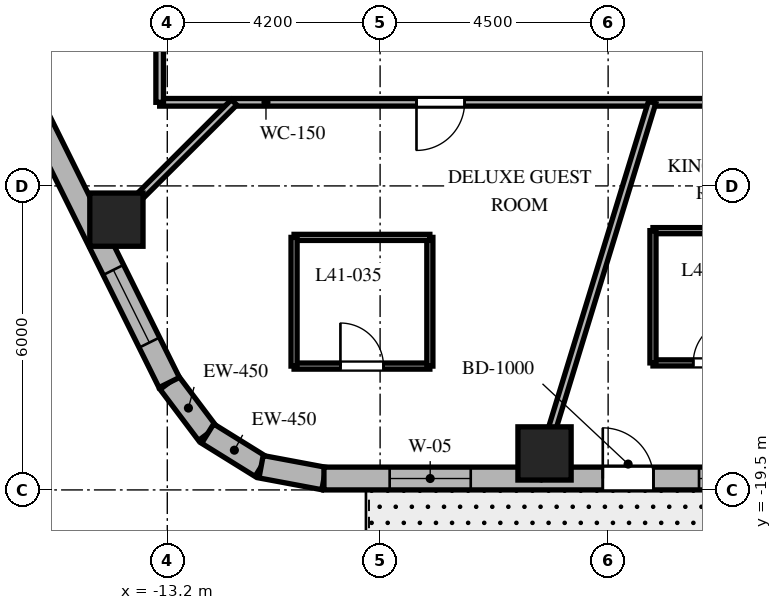
"""IFC4 building model, lengths in metres.
Left out: names, types, materials, properties, quantities, classifications, styles, units other than length and angle.
Written with IfcOpenShell. Run it as: python <this file> out.ifc"""

import sys

from ifc_helpers import new_model, si_unit, direction, frame, frame_2d, origin, origin_2d, place, context, subcontext, project, spatial, rectangle, extrude, element, fill, save


model = new_model("IFC4")
c1 = context("Model", 3, precision=1e-05, world=origin(), true_north=direction((0.0, 1.0)))
c2 = subcontext(c1, "Body", "Model", "MODEL_VIEW")
j1 = project(units=[si_unit("LENGTHUNIT", "METRE"), si_unit("PLANEANGLEUNIT", "RADIAN")], contexts=[c1])
p1 = place(None, origin())
s1 = spatial("IfcSite", under=j1, at=p1, CompositionType="ELEMENT")
p2 = place(p1, origin())
s2 = spatial("IfcBuilding", under=s1, at=p2, CompositionType="ELEMENT")
p3 = place(p2, frame((0.0, 0.0, 166.5)))
s3 = spatial("IfcBuildingStorey", under=s2, at=p3, CompositionType="ELEMENT", Elevation=166.5)
for number, where, z_axis, x_axis in (
    (1, (-5.755, -18.78, 0.0), (0.0, 0.0, 1.0), (1.0, 0.0, 0.0)),
    (2, (-14.204, -14.166, 0.0), (0.0, 0.0, 1.0), (1.0, 0.0, 0.0)),
):
    element("IfcColumn", number, at=place(p3, frame(where, z_axis=z_axis, x_axis=x_axis)), inside=s3, PredefinedType="COLUMN", context=c2, shape_type="SweptSolid", body=[
        extrude(rectangle(XDim=1.05, YDim=1.05, at=origin_2d()), origin(), (0.0, 0.0, 1.0), 3.7),
    ])
p4 = place(p3, frame((-13.162, -17.381, 0.0), z_axis=(0.0, 0.0, 1.0), x_axis=(0.601515770517, -0.798860925205, 0.0)))
e3 = element("IfcWall", 3, at=p4, inside=s3, PredefinedType="SOLIDWALL", context=c2, shape_type="SweptSolid", body=[
    extrude(rectangle(XDim=1.262, YDim=0.45, at=frame_2d((0.631, 0.0))), origin(), (0.0, 0.0, 1.0), 3.38),
])
p5 = place(p3, frame((-12.403, -18.389, 0.0), z_axis=(0.0, 0.0, 1.0), x_axis=(0.849795170926, -0.527113049991, 0.0)))
e4 = element("IfcWall", 4, at=p5, inside=s3, PredefinedType="SOLIDWALL", context=c2, shape_type="SweptSolid", body=[
    extrude(rectangle(XDim=1.241, YDim=0.45, at=frame_2d((0.62, 0.0))), origin(), (0.0, 0.0, 1.0), 3.38),
])
p6 = place(p3, frame((-11.349, -19.043, 0.0), z_axis=(0.0, 0.0, 1.0), x_axis=(0.982931267051, -0.183973161772, 0.0)))
e5 = element("IfcWall", 5, at=p6, inside=s3, PredefinedType="SOLIDWALL", context=c2, shape_type="SweptSolid", body=[
    extrude(rectangle(XDim=1.262, YDim=0.45, at=frame_2d((0.631, 0.0))), origin(), (0.0, 0.0, 1.0), 3.38),
])
p7 = place(p3, frame((-10.108, -19.275, 0.0), z_axis=(0.0, 0.0, 1.0), x_axis=(1.0, 0.0, 0.0)))
e6 = element("IfcWall", 6, at=p7, inside=s3, PredefinedType="SOLIDWALL", context=c2, shape_type="SweptSolid", body=[
    extrude(rectangle(XDim=21.829, YDim=0.45, at=frame_2d((10.915, 0.0))), origin(), (0.0, 0.0, 1.0), 3.38),
])
p8 = place(p7, frame((5.503, 0.0, 0.0)))
e7 = element("IfcOpeningElement", 7, at=p8, cuts=e6, PredefinedType="OPENING", context=c2, shape_type="SweptSolid", body=[
    extrude(rectangle(XDim=1.0, YDim=2.15, at=frame_2d((0.5, 1.075))), frame((0.0, 0.235, 0.0), z_axis=(0.0, -1.0, 0.0), x_axis=(1.0, 0.0, 0.0)), (0.0, 0.0, 1.0), 0.47),
])
p9 = place(p7, frame((1.297, 0.0, 0.8)))
e8 = element("IfcOpeningElement", 8, at=p9, cuts=e6, PredefinedType="OPENING", context=c2, shape_type="SweptSolid", body=[
    extrude(rectangle(XDim=1.6, YDim=1.75, at=frame_2d((0.8, 0.875))), frame((0.0, 0.235, 0.0), z_axis=(0.0, -1.0, 0.0), x_axis=(1.0, 0.0, 0.0)), (0.0, 0.0, 1.0), 0.47),
])
p10 = place(p7, frame((7.402, 0.0, 0.8)))
e9 = element("IfcOpeningElement", 9, at=p10, cuts=e6, PredefinedType="OPENING", context=c2, shape_type="SweptSolid", body=[
    extrude(rectangle(XDim=1.6, YDim=1.75, at=frame_2d((0.8, 0.875))), frame((0.0, 0.235, 0.0), z_axis=(0.0, -1.0, 0.0), x_axis=(1.0, 0.0, 0.0)), (0.0, 0.0, 1.0), 0.47),
])
p11 = place(p7, frame((12.684, 0.0, 0.8)))
e10 = element("IfcOpeningElement", 10, at=p11, cuts=e6, PredefinedType="OPENING", context=c2, shape_type="SweptSolid", body=[
    extrude(rectangle(XDim=1.6, YDim=1.75, at=frame_2d((0.8, 0.875))), frame((0.0, 0.235, 0.0), z_axis=(0.0, -1.0, 0.0), x_axis=(1.0, 0.0, 0.0)), (0.0, 0.0, 1.0), 0.47),
])
p12 = place(p7, frame((18.933, 0.0, 0.8)))
e11 = element("IfcOpeningElement", 11, at=p12, cuts=e6, PredefinedType="OPENING", context=c2, shape_type="SweptSolid", body=[
    extrude(rectangle(XDim=1.6, YDim=1.75, at=frame_2d((0.8, 0.875))), frame((0.0, 0.235, 0.0), z_axis=(0.0, -1.0, 0.0), x_axis=(1.0, 0.0, 0.0)), (0.0, 0.0, 1.0), 0.47),
])
p13 = place(p3, frame((-20.618, -2.344, 0.0), z_axis=(0.0, 0.0, 1.0), x_axis=(0.444243691097, -0.895905990002, 0.0)))
e12 = element("IfcWall", 12, at=p13, inside=s3, PredefinedType="SOLIDWALL", context=c2, shape_type="SweptSolid", body=[
    extrude(rectangle(XDim=16.784, YDim=0.45, at=frame_2d((8.392, 0.0))), origin(), (0.0, 0.0, 1.0), 3.38),
])
p14 = place(p13, frame((0.931, 0.0, 0.8)))
e13 = element("IfcOpeningElement", 13, at=p14, cuts=e12, PredefinedType="OPENING", context=c2, shape_type="SweptSolid", body=[
    extrude(rectangle(XDim=1.6, YDim=1.75, at=frame_2d((0.8, 0.875))), frame((0.0, 0.235, 0.0), z_axis=(0.0, -1.0, 0.0), x_axis=(1.0, 0.0, 0.0)), (0.0, 0.0, 1.0), 0.47),
])
p15 = place(p13, frame((7.642, 0.0, 0.8)))
e14 = element("IfcOpeningElement", 14, at=p15, cuts=e12, PredefinedType="OPENING", context=c2, shape_type="SweptSolid", body=[
    extrude(rectangle(XDim=1.6, YDim=1.75, at=frame_2d((0.8, 0.875))), frame((0.0, 0.235, 0.0), z_axis=(0.0, -1.0, 0.0), x_axis=(1.0, 0.0, 0.0)), (0.0, 0.0, 1.0), 0.47),
])
p16 = place(p13, frame((14.303, 0.0, 0.8)))
e15 = element("IfcOpeningElement", 15, at=p16, cuts=e12, PredefinedType="OPENING", context=c2, shape_type="SweptSolid", body=[
    extrude(rectangle(XDim=1.6, YDim=1.75, at=frame_2d((0.8, 0.875))), frame((0.0, 0.235, 0.0), z_axis=(0.0, -1.0, 0.0), x_axis=(1.0, 0.0, 0.0)), (0.0, 0.0, 1.0), 0.47),
])
p17 = place(p3, frame((13.35, -11.85, 0.0), z_axis=(0.0, 0.0, 1.0), x_axis=(-1.0, 0.0, 0.0)))
e16 = element("IfcWall", 16, at=p17, inside=s3, PredefinedType="PARTITIONING", context=c2, shape_type="SweptSolid", body=[
    extrude(rectangle(XDim=26.7, YDim=0.15, at=frame_2d((13.35, 0.0))), origin(), (0.0, 0.0, 1.0), 2.82),
])
p18 = place(p17, frame((20.682, 0.0, 0.0)))
e17 = element("IfcOpeningElement", 17, at=p18, cuts=e16, PredefinedType="OPENING", context=c2, shape_type="SweptSolid", body=[
    extrude(rectangle(XDim=0.95, YDim=2.03, at=frame_2d((0.475, 1.015))), frame((0.0, 0.085, 0.0), z_axis=(0.0, -1.0, 0.0), x_axis=(1.0, 0.0, 0.0)), (0.0, 0.0, 1.0), 0.17),
])
p19 = place(p17, frame((14.708, 0.0, 0.0)))
e18 = element("IfcOpeningElement", 18, at=p19, cuts=e16, PredefinedType="OPENING", context=c2, shape_type="SweptSolid", body=[
    extrude(rectangle(XDim=0.95, YDim=2.03, at=frame_2d((0.475, 1.015))), frame((0.0, 0.085, 0.0), z_axis=(0.0, -1.0, 0.0), x_axis=(1.0, 0.0, 0.0)), (0.0, 0.0, 1.0), 0.17),
])
p20 = place(p17, frame((10.553, 0.0, 0.0)))
e19 = element("IfcOpeningElement", 19, at=p20, cuts=e16, PredefinedType="OPENING", context=c2, shape_type="SweptSolid", body=[
    extrude(rectangle(XDim=0.95, YDim=2.03, at=frame_2d((0.475, 1.015))), frame((0.0, 0.085, 0.0), z_axis=(0.0, -1.0, 0.0), x_axis=(1.0, 0.0, 0.0)), (0.0, 0.0, 1.0), 0.17),
])
p21 = place(p17, frame((6.353, 0.0, 0.0)))
e20 = element("IfcOpeningElement", 20, at=p21, cuts=e16, PredefinedType="OPENING", context=c2, shape_type="SweptSolid", body=[
    extrude(rectangle(XDim=0.9, YDim=2.03, at=frame_2d((0.45, 1.015))), frame((0.0, 0.085, 0.0), z_axis=(0.0, -1.0, 0.0), x_axis=(1.0, 0.0, 0.0)), (0.0, 0.0, 1.0), 0.17),
])
p22 = place(p17, frame((2.15, 0.0, 0.0)))
e21 = element("IfcOpeningElement", 21, at=p22, cuts=e16, PredefinedType="OPENING", context=c2, shape_type="SweptSolid", body=[
    extrude(rectangle(XDim=0.9, YDim=2.03, at=frame_2d((0.45, 1.015))), frame((0.0, 0.085, 0.0), z_axis=(0.0, -1.0, 0.0), x_axis=(1.0, 0.0, 0.0)), (0.0, 0.0, 1.0), 0.17),
])
p23 = place(p3, frame((-13.35, -11.85, 0.0), z_axis=(0.0, 0.0, 1.0), x_axis=(0.0, 1.0, 0.0)))
e22 = element("IfcWall", 22, at=p23, inside=s3, PredefinedType="PARTITIONING", context=c2, shape_type="SweptSolid", body=[
    extrude(rectangle(XDim=23.7, YDim=0.15, at=frame_2d((11.85, 0.0))), origin(), (0.0, 0.0, 1.0), 2.82),
])
p24 = place(p23, frame((20.136, 0.0, 0.0)))
e23 = element("IfcOpeningElement", 23, at=p24, cuts=e22, PredefinedType="OPENING", context=c2, shape_type="SweptSolid", body=[
    extrude(rectangle(XDim=0.9, YDim=2.03, at=frame_2d((0.45, 1.015))), frame((0.0, 0.085, 0.0), z_axis=(0.0, -1.0, 0.0), x_axis=(1.0, 0.0, 0.0)), (0.0, 0.0, 1.0), 0.17),
])
p25 = place(p23, frame((15.551, 0.0, 0.0)))
e24 = element("IfcOpeningElement", 24, at=p25, cuts=e22, PredefinedType="OPENING", context=c2, shape_type="SweptSolid", body=[
    extrude(rectangle(XDim=0.9, YDim=2.03, at=frame_2d((0.45, 1.015))), frame((0.0, 0.085, 0.0), z_axis=(0.0, -1.0, 0.0), x_axis=(1.0, 0.0, 0.0)), (0.0, 0.0, 1.0), 0.17),
])
p26 = place(p23, frame((12.494, 0.0, 0.0)))
e25 = element("IfcOpeningElement", 25, at=p26, cuts=e22, PredefinedType="OPENING", context=c2, shape_type="SweptSolid", body=[
    extrude(rectangle(XDim=0.9, YDim=2.03, at=frame_2d((0.45, 1.015))), frame((0.0, 0.085, 0.0), z_axis=(0.0, -1.0, 0.0), x_axis=(1.0, 0.0, 0.0)), (0.0, 0.0, 1.0), 0.17),
])
p27 = place(p23, frame((9.424, 0.0, 0.0)))
e26 = element("IfcOpeningElement", 26, at=p27, cuts=e22, PredefinedType="OPENING", context=c2, shape_type="SweptSolid", body=[
    extrude(rectangle(XDim=0.95, YDim=2.03, at=frame_2d((0.475, 1.015))), frame((0.0, 0.085, 0.0), z_axis=(0.0, -1.0, 0.0), x_axis=(1.0, 0.0, 0.0)), (0.0, 0.0, 1.0), 0.17),
])
p28 = place(p23, frame((3.765, 0.0, 0.0)))
e27 = element("IfcOpeningElement", 27, at=p28, cuts=e22, PredefinedType="OPENING", context=c2, shape_type="SweptSolid", body=[
    extrude(rectangle(XDim=0.9, YDim=2.03, at=frame_2d((0.45, 1.015))), frame((0.0, 0.085, 0.0), z_axis=(0.0, -1.0, 0.0), x_axis=(1.0, 0.0, 0.0)), (0.0, 0.0, 1.0), 0.17),
])
p29 = place(p3, frame((-11.882, -11.85, 0.0), z_axis=(0.0, 0.0, 1.0), x_axis=(-0.708037373639, -0.706174962407, 0.0)))
e28 = element("IfcWall", 28, at=p29, inside=s3, PredefinedType="PARTITIONING", context=c2, shape_type="SweptSolid", body=[
    extrude(rectangle(XDim=3.802, YDim=0.15, at=frame_2d((1.901, 0.0))), origin(), (0.0, 0.0, 1.0), 2.62),
])
p30 = place(p3, frame((-3.631, -11.85, 0.0), z_axis=(0.0, 0.0, 1.0), x_axis=(-0.293007573338, -0.956110120209, 0.0)))
e29 = element("IfcWall", 29, at=p30, inside=s3, PredefinedType="PARTITIONING", context=c2, shape_type="SweptSolid", body=[
    extrude(rectangle(XDim=7.766, YDim=0.15, at=frame_2d((3.883, 0.0))), origin(), (0.0, 0.0, 1.0), 2.62),
])
p31 = place(p3, frame((-10.698, -17.056, 0.0), z_axis=(0.0, 0.0, 1.0), x_axis=(1.0, 0.0, 0.0)))
e30 = element("IfcWall", 30, at=p31, inside=s3, PredefinedType="PARTITIONING", context=c2, shape_type="SweptSolid", body=[
    extrude(rectangle(XDim=2.68, YDim=0.12, at=frame_2d((1.34, 0.0))), origin(), (0.0, 0.0, 1.0), 2.62),
])
p32 = place(p31, frame((0.915, 0.0, 0.0)))
e31 = element("IfcOpeningElement", 31, at=p32, cuts=e30, PredefinedType="OPENING", context=c2, shape_type="SweptSolid", body=[
    extrude(rectangle(XDim=0.85, YDim=2.03, at=frame_2d((0.425, 1.015))), frame((0.0, 0.07, 0.0), z_axis=(0.0, -1.0, 0.0), x_axis=(1.0, 0.0, 0.0)), (0.0, 0.0, 1.0), 0.14),
])
p33 = place(p3, frame((-8.018, -17.056, 0.0), z_axis=(0.0, 0.0, 1.0), x_axis=(0.0, 1.0, 0.0)))
e32 = element("IfcWall", 32, at=p33, inside=s3, PredefinedType="PARTITIONING", context=c2, shape_type="SweptSolid", body=[
    extrude(rectangle(XDim=2.54, YDim=0.12, at=frame_2d((1.27, 0.0))), origin(), (0.0, 0.0, 1.0), 3.38),
])
p34 = place(p3, frame((-8.018, -14.516, 0.0), z_axis=(0.0, 0.0, 1.0), x_axis=(-1.0, 0.0, 0.0)))
e33 = element("IfcWall", 33, at=p34, inside=s3, PredefinedType="PARTITIONING", context=c2, shape_type="SweptSolid", body=[
    extrude(rectangle(XDim=2.68, YDim=0.12, at=frame_2d((1.34, 0.0))), origin(), (0.0, 0.0, 1.0), 3.38),
])
p35 = place(p3, frame((-10.698, -14.516, 0.0), z_axis=(0.0, 0.0, 1.0), x_axis=(0.0, -1.0, 0.0)))
e34 = element("IfcWall", 34, at=p35, inside=s3, PredefinedType="PARTITIONING", context=c2, shape_type="SweptSolid", body=[
    extrude(rectangle(XDim=2.54, YDim=0.12, at=frame_2d((1.27, 0.0))), origin(), (0.0, 0.0, 1.0), 2.62),
])
p36 = place(p3, frame((-3.615, -16.993, 0.0), z_axis=(0.0, 0.0, 1.0), x_axis=(1.0, 0.0, 0.0)))
e35 = element("IfcWall", 35, at=p36, inside=s3, PredefinedType="PARTITIONING", context=c2, shape_type="SweptSolid", body=[
    extrude(rectangle(XDim=2.44, YDim=0.12, at=frame_2d((1.22, 0.0))), origin(), (0.0, 0.0, 1.0), 3.38),
])
p37 = place(p36, frame((0.795, 0.0, 0.0)))
e36 = element("IfcOpeningElement", 36, at=p37, cuts=e35, PredefinedType="OPENING", context=c2, shape_type="SweptSolid", body=[
    extrude(rectangle(XDim=0.85, YDim=2.03, at=frame_2d((0.425, 1.015))), frame((0.0, 0.07, 0.0), z_axis=(0.0, -1.0, 0.0), x_axis=(1.0, 0.0, 0.0)), (0.0, 0.0, 1.0), 0.14),
])
p38 = place(p3, frame((-1.175, -14.383, 0.0), z_axis=(0.0, 0.0, 1.0), x_axis=(-1.0, 0.0, 0.0)))
e37 = element("IfcWall", 37, at=p38, inside=s3, PredefinedType="PARTITIONING", context=c2, shape_type="SweptSolid", body=[
    extrude(rectangle(XDim=2.44, YDim=0.12, at=frame_2d((1.22, 0.0))), origin(), (0.0, 0.0, 1.0), 3.38),
])
p39 = place(p3, frame((-3.615, -14.383, 0.0), z_axis=(0.0, 0.0, 1.0), x_axis=(0.0, -1.0, 0.0)))
e38 = element("IfcWall", 38, at=p39, inside=s3, PredefinedType="PARTITIONING", context=c2, shape_type="SweptSolid", body=[
    extrude(rectangle(XDim=2.61, YDim=0.12, at=frame_2d((1.305, 0.0))), origin(), (0.0, 0.0, 1.0), 2.82),
])
p40 = place(p8, origin())
e39 = element("IfcDoor", 39, at=p40, inside=s3, OperationType="SINGLE_SWING_LEFT", PredefinedType="DOOR", context=c2, shape_type="SweptSolid", body=[
    extrude(rectangle(XDim=1.0, YDim=2.15, at=frame_2d((0.5, 1.075))), frame((0.0, 0.025, 0.0), z_axis=(0.0, -1.0, 0.0), x_axis=(1.0, 0.0, 0.0)), (0.0, 0.0, 1.0), 0.05),
])
fill(e7, e39)
p41 = place(p9, origin())
e40 = element("IfcWindow", 40, at=p41, inside=s3, PartitioningType="SINGLE_PANEL", PredefinedType="WINDOW", context=c2, shape_type="SweptSolid", body=[
    extrude(rectangle(XDim=1.6, YDim=1.75, at=frame_2d((0.8, 0.875))), frame((0.0, 0.03, 0.0), z_axis=(0.0, -1.0, 0.0), x_axis=(1.0, 0.0, 0.0)), (0.0, 0.0, 1.0), 0.06),
])
fill(e8, e40)
p42 = place(p10, origin())
e41 = element("IfcWindow", 41, at=p42, inside=s3, PartitioningType="SINGLE_PANEL", PredefinedType="WINDOW", context=c2, shape_type="SweptSolid", body=[
    extrude(rectangle(XDim=1.6, YDim=1.75, at=frame_2d((0.8, 0.875))), frame((0.0, 0.03, 0.0), z_axis=(0.0, -1.0, 0.0), x_axis=(1.0, 0.0, 0.0)), (0.0, 0.0, 1.0), 0.06),
])
fill(e9, e41)
p43 = place(p16, origin())
e42 = element("IfcWindow", 42, at=p43, inside=s3, PartitioningType="SINGLE_PANEL", PredefinedType="WINDOW", context=c2, shape_type="SweptSolid", body=[
    extrude(rectangle(XDim=1.6, YDim=1.75, at=frame_2d((0.8, 0.875))), frame((0.0, 0.03, 0.0), z_axis=(0.0, -1.0, 0.0), x_axis=(1.0, 0.0, 0.0)), (0.0, 0.0, 1.0), 0.06),
])
fill(e15, e42)
p44 = place(p18, origin())
e43 = element("IfcDoor", 43, at=p44, inside=s3, OperationType="SINGLE_SWING_RIGHT", PredefinedType="DOOR", context=c2, shape_type="SweptSolid", body=[
    extrude(rectangle(XDim=0.95, YDim=2.03, at=frame_2d((0.475, 1.015))), frame((0.0, 0.025, 0.0), z_axis=(0.0, -1.0, 0.0), x_axis=(1.0, 0.0, 0.0)), (0.0, 0.0, 1.0), 0.05),
])
fill(e17, e43)
p45 = place(p32, origin())
e44 = element("IfcDoor", 44, at=p45, inside=s3, OperationType="SINGLE_SWING_LEFT", PredefinedType="DOOR", context=c2, shape_type="SweptSolid", body=[
    extrude(rectangle(XDim=0.85, YDim=2.03, at=frame_2d((0.425, 1.015))), frame((0.0, 0.025, 0.0), z_axis=(0.0, -1.0, 0.0), x_axis=(1.0, 0.0, 0.0)), (0.0, 0.0, 1.0), 0.05),
])
fill(e31, e44)
p46 = place(p37, origin())
e45 = element("IfcDoor", 45, at=p46, inside=s3, OperationType="SINGLE_SWING_RIGHT", PredefinedType="DOOR", context=c2, shape_type="SweptSolid", body=[
    extrude(rectangle(XDim=0.85, YDim=2.03, at=frame_2d((0.425, 1.015))), frame((0.0, 0.025, 0.0), z_axis=(0.0, -1.0, 0.0), x_axis=(1.0, 0.0, 0.0)), (0.0, 0.0, 1.0), 0.05),
])
fill(e36, e45)
save(model, sys.argv[1])
